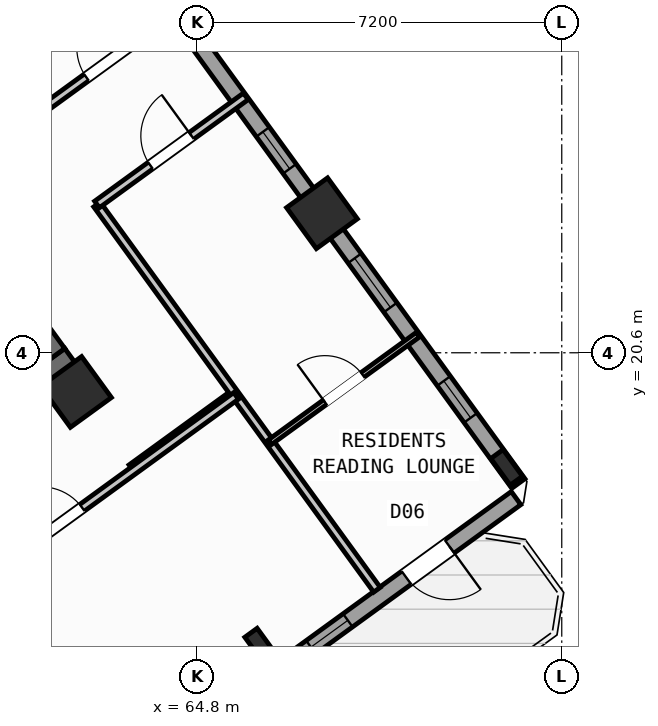
"""IFC4 building model, lengths in metres.
Left out: names, types, materials, properties, quantities, classifications, styles, units other than length and angle.
Written with IfcOpenShell. Run it as: python <this file> out.ifc"""

import sys

from ifc_helpers import new_model, si_unit, direction, frame, frame_2d, origin, origin_2d, place, context, subcontext, project, spatial, rectangle, hollow_rectangle, i_section, extrude, source, transform, mapped, element, fill, save


model = new_model("IFC4")
c1 = context("Model", 3, precision=1e-05, world=origin(), true_north=direction((0.0, 1.0)))
c2 = subcontext(c1, "Body", "Model", "MODEL_VIEW")
j1 = project(units=[si_unit("LENGTHUNIT", "METRE"), si_unit("PLANEANGLEUNIT", "RADIAN")], contexts=[c1])
p1 = place(None, origin())
s1 = spatial("IfcSite", under=j1, at=p1, CompositionType="ELEMENT")
p2 = place(p1, origin())
s2 = spatial("IfcBuilding", under=s1, at=p2, CompositionType="ELEMENT")
p3 = place(p2, frame((0.0, 0.0, 60.0)))
s3 = spatial("IfcBuildingStorey", under=s2, at=p3, CompositionType="ELEMENT", Elevation=60.0)
p4 = place(p3, frame((52.318, 13.11, 0.0), z_axis=(0.0, 0.0, 1.0), x_axis=(0.809019445368, 0.587781878776, 0.0)))
e1 = element("IfcWall", 1, at=p4, inside=s3, PredefinedType="SHEAR", context=c2, shape_type="SweptSolid", body=[
    extrude(rectangle(XDim=12.44, YDim=0.65, at=frame_2d((6.22, 0.0))), origin(), (0.0, 0.0, 1.0), 3.35),
])
p5 = place(p3, frame((61.929, 20.494, 0.0), z_axis=(0.0, 0.0, 1.0), x_axis=(-0.58782982593, 0.808984607855, 0.0)))
e2 = element("IfcWall", 2, at=p5, inside=s3, PredefinedType="SHEAR", context=c2, shape_type="SweptSolid", body=[
    extrude(rectangle(XDim=3.525, YDim=0.65, at=frame_2d((1.762, 0.0))), origin(), (0.0, 0.0, 1.0), 3.35),
])
m1 = source(origin(), c2, "Body", "SweptSolid", [
    extrude(i_section(OverallWidth=0.3, OverallDepth=0.65, WebThickness=0.016, FlangeThickness=0.031, at=origin_2d()), origin(), (0.0, 0.0, 1.0), 3.6),
])
p6 = place(p3, frame((66.058, 14.811, 0.0), z_axis=(0.0, 0.0, 1.0), x_axis=(0.809016994375, 0.587785252292, 0.0)))
e3 = element("IfcColumn", 3, at=p6, inside=s3, PredefinedType="COLUMN", context=c2, shape_type="MappedRepresentation", body=[
    mapped(m1, transform((0.0, 0.0, 0.0), scale=1.0)),
])
m2 = source(origin(), c2, "Body", "SweptSolid", [
    extrude(hollow_rectangle(XDim=1.0, YDim=1.0, WallThickness=0.04, at=origin_2d()), origin(), (0.0, 0.0, 1.0), 3.6),
])
p7 = place(p3, frame((62.414, 19.827, 0.0), z_axis=(0.0, 0.0, 1.0), x_axis=(0.809016994375, 0.587785252292, 0.0)))
e4 = element("IfcColumn", 4, at=p7, inside=s3, PredefinedType="COLUMN", context=c2, shape_type="MappedRepresentation", body=[
    mapped(m2, transform((0.0, 0.0, 0.0), scale=1.0)),
])
p8 = place(p3, frame((70.912, 18.338, 0.0), z_axis=(0.0, 0.0, 1.0), x_axis=(0.809016994375, 0.587785252292, 0.0)))
e5 = element("IfcColumn", 5, at=p8, inside=s3, PredefinedType="COLUMN", context=c2, shape_type="MappedRepresentation", body=[
    mapped(m1, transform((0.0, 0.0, 0.0), scale=1.0)),
])
p9 = place(p3, frame((67.268, 23.354, 0.0), z_axis=(0.0, 0.0, 1.0), x_axis=(0.809016994375, 0.587785252292, 0.0)))
e6 = element("IfcColumn", 6, at=p9, inside=s3, PredefinedType="COLUMN", context=c2, shape_type="MappedRepresentation", body=[
    mapped(m2, transform((0.0, 0.0, 0.0), scale=1.0)),
])
p10 = place(p3, frame((58.455, 35.484, 0.0), z_axis=(0.0, 0.0, 1.0), x_axis=(0.587783625747, -0.809018176127, 0.0)))
e7 = element("IfcWall", 7, at=p10, inside=s3, PredefinedType="STANDARD", context=c2, shape_type="SweptSolid", body=[
    extrude(rectangle(XDim=21.587, YDim=0.32, at=frame_2d((10.794, 0.0))), origin(), (0.0, 0.0, 1.0), 2.725),
])
p11 = place(p10, frame((1.54, 0.0, 0.85)))
e8 = element("IfcOpeningElement", 8, at=p11, cuts=e7, PredefinedType="OPENING", context=c2, shape_type="SweptSolid", body=[
    extrude(rectangle(XDim=1.5, YDim=1.5, at=frame_2d((0.75, 0.75))), frame((0.0, 0.17, 0.0), z_axis=(0.0, -1.0, 0.0), x_axis=(1.0, 0.0, 0.0)), (0.0, 0.0, 1.0), 0.34),
])
p12 = place(p10, frame((4.695, 0.0, 0.85)))
e9 = element("IfcOpeningElement", 9, at=p12, cuts=e7, PredefinedType="OPENING", context=c2, shape_type="SweptSolid", body=[
    extrude(rectangle(XDim=1.8, YDim=1.5, at=frame_2d((0.9, 0.75))), frame((0.0, 0.17, 0.0), z_axis=(0.0, -1.0, 0.0), x_axis=(1.0, 0.0, 0.0)), (0.0, 0.0, 1.0), 0.34),
])
p13 = place(p10, frame((13.009, 0.0, 1.0)))
e10 = element("IfcOpeningElement", 10, at=p13, cuts=e7, PredefinedType="OPENING", context=c2, shape_type="SweptSolid", body=[
    extrude(rectangle(XDim=0.9, YDim=1.25, at=frame_2d((0.45, 0.625))), frame((0.0, 0.17, 0.0), z_axis=(0.0, -1.0, 0.0), x_axis=(1.0, 0.0, 0.0)), (0.0, 0.0, 1.0), 0.34),
])
p14 = place(p10, frame((16.092, 0.0, 0.95)))
e11 = element("IfcOpeningElement", 11, at=p14, cuts=e7, PredefinedType="OPENING", context=c2, shape_type="SweptSolid", body=[
    extrude(rectangle(XDim=1.2, YDim=1.4, at=frame_2d((0.6, 0.7))), frame((0.0, 0.17, 0.0), z_axis=(0.0, -1.0, 0.0), x_axis=(1.0, 0.0, 0.0)), (0.0, 0.0, 1.0), 0.34),
])
p15 = place(p10, frame((19.085, 0.0, 1.0)))
e12 = element("IfcOpeningElement", 12, at=p15, cuts=e7, PredefinedType="OPENING", context=c2, shape_type="SweptSolid", body=[
    extrude(rectangle(XDim=0.9, YDim=1.25, at=frame_2d((0.45, 0.625))), frame((0.0, 0.17, 0.0), z_axis=(0.0, -1.0, 0.0), x_axis=(1.0, 0.0, 0.0)), (0.0, 0.0, 1.0), 0.34),
])
p16 = place(p3, frame((71.098, 17.731, 0.0), z_axis=(0.0, 0.0, 1.0), x_axis=(-0.809021120468, -0.587779573171, 0.0)))
e13 = element("IfcWall", 13, at=p16, inside=s3, PredefinedType="STANDARD", context=c2, shape_type="SweptSolid", body=[
    extrude(rectangle(XDim=17.588, YDim=0.32, at=frame_2d((8.794, 0.0))), origin(), (0.0, 0.0, 1.0), 3.35),
])
p17 = place(p16, frame((1.624, 0.0, 0.0)))
e14 = element("IfcOpeningElement", 14, at=p17, cuts=e13, PredefinedType="OPENING", context=c2, shape_type="SweptSolid", body=[
    extrude(rectangle(XDim=1.05, YDim=2.15, at=frame_2d((0.525, 1.075))), frame((0.0, 0.17, 0.0), z_axis=(0.0, -1.0, 0.0), x_axis=(1.0, 0.0, 0.0)), (0.0, 0.0, 1.0), 0.34),
])
p18 = place(p16, frame((4.104, 0.0, 1.0)))
e15 = element("IfcOpeningElement", 15, at=p18, cuts=e13, PredefinedType="OPENING", context=c2, shape_type="SweptSolid", body=[
    extrude(rectangle(XDim=0.9, YDim=1.25, at=frame_2d((0.45, 0.625))), frame((0.0, 0.17, 0.0), z_axis=(0.0, -1.0, 0.0), x_axis=(1.0, 0.0, 0.0)), (0.0, 0.0, 1.0), 0.34),
])
p19 = place(p16, frame((7.879, 0.0, 0.85)))
e16 = element("IfcOpeningElement", 16, at=p19, cuts=e13, PredefinedType="OPENING", context=c2, shape_type="SweptSolid", body=[
    extrude(rectangle(XDim=1.8, YDim=1.5, at=frame_2d((0.9, 0.75))), frame((0.0, 0.17, 0.0), z_axis=(0.0, -1.0, 0.0), x_axis=(1.0, 0.0, 0.0)), (0.0, 0.0, 1.0), 0.34),
])
p20 = place(p16, frame((13.529, 0.0, 0.85)))
e17 = element("IfcOpeningElement", 17, at=p20, cuts=e13, PredefinedType="OPENING", context=c2, shape_type="SweptSolid", body=[
    extrude(rectangle(XDim=1.5, YDim=1.5, at=frame_2d((0.75, 0.75))), frame((0.0, 0.17, 0.0), z_axis=(0.0, -1.0, 0.0), x_axis=(1.0, 0.0, 0.0)), (0.0, 0.0, 1.0), 0.34),
])
p21 = place(p3, frame((63.507, 18.322, 0.0), z_axis=(0.0, 0.0, 1.0), x_axis=(0.809034604122, 0.587761013791, 0.0)))
e18 = element("IfcWall", 18, at=p21, inside=s3, PredefinedType="PARTITIONING", context=c2, shape_type="SweptSolid", body=[
    extrude(rectangle(XDim=2.51, YDim=0.16, at=frame_2d((1.255, 0.0))), origin(), (0.0, 0.0, 1.0), 3.34),
])
p22 = place(p3, frame((68.353, 15.922, 0.0), z_axis=(0.0, 0.0, 1.0), x_axis=(-0.587784007866, 0.809017898502, 0.0)))
e19 = element("IfcWall", 19, at=p22, inside=s3, PredefinedType="PARTITIONING", context=c2, shape_type="SweptSolid", body=[
    extrude(rectangle(XDim=9.4, YDim=0.16, at=frame_2d((4.7, 0.0))), origin(), (0.0, 0.0, 1.0), 3.34),
])
p23 = place(p3, frame((62.828, 23.527, 0.0), z_axis=(0.0, 0.0, 1.0), x_axis=(0.809003564202, 0.587803736896, 0.0)))
e20 = element("IfcWall", 20, at=p23, inside=s3, PredefinedType="PARTITIONING", context=c2, shape_type="SweptSolid", body=[
    extrude(rectangle(XDim=3.63, YDim=0.16, at=frame_2d((1.815, 0.0))), origin(), (0.0, 0.0, 1.0), 3.34),
])
p24 = place(p23, frame((1.305, 0.0, 0.0)))
e21 = element("IfcOpeningElement", 21, at=p24, cuts=e20, PredefinedType="OPENING", context=c2, shape_type="SweptSolid", body=[
    extrude(rectangle(XDim=1.0, YDim=2.1, at=frame_2d((0.5, 1.05))), frame((0.0, 0.09, 0.0), z_axis=(0.0, -1.0, 0.0), x_axis=(1.0, 0.0, 0.0)), (0.0, 0.0, 1.0), 0.18),
])
p25 = place(p3, frame((61.564, 25.266, 0.0), z_axis=(0.0, 0.0, 1.0), x_axis=(0.809012309495, 0.587791700422, 0.0)))
e22 = element("IfcWall", 22, at=p25, inside=s3, PredefinedType="PARTITIONING", context=c2, shape_type="SweptSolid", body=[
    extrude(rectangle(XDim=3.63, YDim=0.16, at=frame_2d((1.815, 0.0))), origin(), (0.0, 0.0, 1.0), 3.34),
])
p26 = place(p25, frame((1.305, 0.0, 0.0)))
e23 = element("IfcOpeningElement", 23, at=p26, cuts=e22, PredefinedType="OPENING", context=c2, shape_type="SweptSolid", body=[
    extrude(rectangle(XDim=1.0, YDim=2.1, at=frame_2d((0.5, 1.05))), frame((0.0, 0.09, 0.0), z_axis=(0.0, -1.0, 0.0), x_axis=(1.0, 0.0, 0.0)), (0.0, 0.0, 1.0), 0.18),
])
p27 = place(p3, frame((66.238, 18.833, 0.0), z_axis=(0.0, 0.0, 1.0), x_axis=(0.809013833588, 0.587789602718, 0.0)))
e24 = element("IfcWall", 24, at=p27, inside=s3, PredefinedType="PARTITIONING", context=c2, shape_type="SweptSolid", body=[
    extrude(rectangle(XDim=3.61, YDim=0.11, at=frame_2d((1.805, 0.0))), origin(), (0.0, 0.0, 1.0), 3.34),
])
p28 = place(p27, frame((1.345, 0.0, 0.0)))
e25 = element("IfcOpeningElement", 25, at=p28, cuts=e24, PredefinedType="OPENING", context=c2, shape_type="SweptSolid", body=[
    extrude(rectangle(XDim=0.92, YDim=2.08, at=frame_2d((0.46, 1.04))), frame((0.0, 0.065, 0.0), z_axis=(0.0, -1.0, 0.0), x_axis=(1.0, 0.0, 0.0)), (0.0, 0.0, 1.0), 0.13),
])
p29 = place(p3, frame((53.705, 11.126, 0.0), z_axis=(0.0, 0.0, 1.0), x_axis=(0.809014504436, 0.587788679384, 0.0)))
e26 = element("IfcWall", 26, at=p29, inside=s3, PredefinedType="PARTITIONING", context=c2, shape_type="SweptSolid", body=[
    extrude(rectangle(XDim=14.67, YDim=0.16, at=frame_2d((7.335, 0.0))), origin(), (0.0, 0.0, 1.0), 3.34),
])
p30 = place(p29, frame((3.215, 0.0, 0.0)))
e27 = element("IfcOpeningElement", 27, at=p30, cuts=e26, PredefinedType="OPENING", context=c2, shape_type="SweptSolid", body=[
    extrude(rectangle(XDim=1.0, YDim=2.1, at=frame_2d((0.5, 1.05))), frame((0.0, 0.09, 0.0), z_axis=(0.0, -1.0, 0.0), x_axis=(1.0, 0.0, 0.0)), (0.0, 0.0, 1.0), 0.18),
])
p31 = place(p29, frame((9.915, 0.0, 0.0)))
e28 = element("IfcOpeningElement", 28, at=p31, cuts=e26, PredefinedType="OPENING", context=c2, shape_type="SweptSolid", body=[
    extrude(rectangle(XDim=1.0, YDim=2.1, at=frame_2d((0.5, 1.05))), frame((0.0, 0.09, 0.0), z_axis=(0.0, -1.0, 0.0), x_axis=(1.0, 0.0, 0.0)), (0.0, 0.0, 1.0), 0.18),
])
m3 = source(origin(), c2, "Body", "SweptSolid", [
    extrude(rectangle(XDim=1.05, YDim=2.15, at=frame_2d((0.525, 1.075))), frame((0.0, 0.025, 0.0), z_axis=(0.0, -1.0, 0.0), x_axis=(1.0, 0.0, 0.0)), (0.0, 0.0, 1.0), 0.05),
])
p32 = place(p17, origin())
e29 = element("IfcDoor", 29, at=p32, inside=s3, OperationType="SINGLE_SWING_LEFT", PredefinedType="DOOR", context=c2, shape_type="MappedRepresentation", body=[
    mapped(m3, transform((0.0, 0.0, 0.0), scale=1.0)),
])
fill(e14, e29)
m4 = source(origin(), c2, "Body", "SweptSolid", [
    extrude(rectangle(XDim=0.9, YDim=1.25, at=frame_2d((0.45, 0.625))), frame((0.0, 0.03, 0.0), z_axis=(0.0, -1.0, 0.0), x_axis=(1.0, 0.0, 0.0)), (0.0, 0.0, 1.0), 0.06),
])
p33 = place(p13, origin())
e30 = element("IfcWindow", 30, at=p33, inside=s3, PartitioningType="SINGLE_PANEL", PredefinedType="WINDOW", context=c2, shape_type="MappedRepresentation", body=[
    mapped(m4, transform((0.0, 0.0, 0.0), scale=1.0)),
])
fill(e10, e30)
m5 = source(origin(), c2, "Body", "SweptSolid", [
    extrude(rectangle(XDim=1.2, YDim=1.4, at=frame_2d((0.6, 0.7))), frame((0.0, 0.03, 0.0), z_axis=(0.0, -1.0, 0.0), x_axis=(1.0, 0.0, 0.0)), (0.0, 0.0, 1.0), 0.06),
])
p34 = place(p14, origin())
e31 = element("IfcWindow", 31, at=p34, inside=s3, PartitioningType="SINGLE_PANEL", PredefinedType="WINDOW", context=c2, shape_type="MappedRepresentation", body=[
    mapped(m5, transform((0.0, 0.0, 0.0), scale=1.0)),
])
fill(e11, e31)
p35 = place(p15, origin())
e32 = element("IfcWindow", 32, at=p35, inside=s3, PartitioningType="SINGLE_PANEL", PredefinedType="WINDOW", context=c2, shape_type="MappedRepresentation", body=[
    mapped(m4, transform((0.0, 0.0, 0.0), scale=1.0)),
])
fill(e12, e32)
p36 = place(p18, origin())
e33 = element("IfcWindow", 33, at=p36, inside=s3, PartitioningType="SINGLE_PANEL", PredefinedType="WINDOW", context=c2, shape_type="MappedRepresentation", body=[
    mapped(m4, transform((0.0, 0.0, 0.0), scale=1.0)),
])
fill(e15, e33)
m6 = source(origin(), c2, "Body", "SweptSolid", [
    extrude(rectangle(XDim=1.0, YDim=2.1, at=frame_2d((0.5, 1.05))), frame((0.0, 0.025, 0.0), z_axis=(0.0, -1.0, 0.0), x_axis=(1.0, 0.0, 0.0)), (0.0, 0.0, 1.0), 0.05),
])
p37 = place(p26, origin())
e34 = element("IfcDoor", 34, at=p37, inside=s3, OperationType="SINGLE_SWING_RIGHT", PredefinedType="DOOR", context=c2, shape_type="MappedRepresentation", body=[
    mapped(m6, transform((0.0, 0.0, 0.0), scale=1.0)),
])
fill(e23, e34)
p38 = place(p24, origin())
e35 = element("IfcDoor", 35, at=p38, inside=s3, OperationType="SINGLE_SWING_RIGHT", PredefinedType="DOOR", context=c2, shape_type="MappedRepresentation", body=[
    mapped(m6, transform((0.0, 0.0, 0.0), scale=1.0)),
])
fill(e21, e35)
m7 = source(origin(), c2, "Body", "SweptSolid", [
    extrude(rectangle(XDim=0.92, YDim=2.08, at=frame_2d((0.46, 1.04))), frame((0.0, 0.025, 0.0), z_axis=(0.0, -1.0, 0.0), x_axis=(1.0, 0.0, 0.0)), (0.0, 0.0, 1.0), 0.05),
])
p39 = place(p28, origin())
e36 = element("IfcDoor", 36, at=p39, inside=s3, OperationType="SINGLE_SWING_LEFT", PredefinedType="DOOR", context=c2, shape_type="MappedRepresentation", body=[
    mapped(m7, transform((0.0, 0.0, 0.0), scale=1.0)),
])
fill(e25, e36)
p40 = place(p31, origin())
e37 = element("IfcDoor", 37, at=p40, inside=s3, OperationType="SINGLE_SWING_LEFT", PredefinedType="DOOR", context=c2, shape_type="MappedRepresentation", body=[
    mapped(m6, transform((0.0, 0.0, 0.0), scale=1.0)),
])
fill(e28, e37)
save(model, sys.argv[1])
